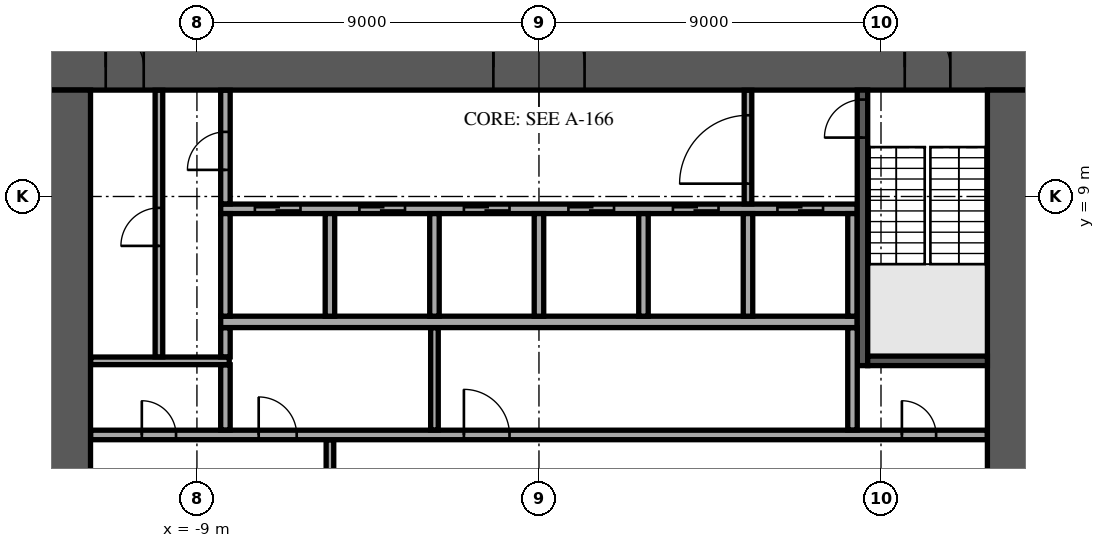
"""IFC4 building model, lengths in metres.
Left out: names, types, materials, properties, quantities, classifications, styles, units other than length and angle.
Written with IfcOpenShell. Run it as: python <this file> out.ifc"""

import sys

from ifc_helpers import new_model, si_unit, direction, frame, frame_2d, origin, place, context, subcontext, project, spatial, rectangle, extrude, element, fill, save


model = new_model("IFC4")
c1 = context("Model", 3, precision=1e-05, world=origin(), true_north=direction((0.0, 1.0)))
c2 = subcontext(c1, "Body", "Model", "MODEL_VIEW")
j1 = project(units=[si_unit("LENGTHUNIT", "METRE"), si_unit("PLANEANGLEUNIT", "RADIAN")], contexts=[c1])
p1 = place(None, origin())
s1 = spatial("IfcSite", under=j1, at=p1, CompositionType="ELEMENT")
p2 = place(p1, origin())
s2 = spatial("IfcBuilding", under=s1, at=p2, CompositionType="ELEMENT")
p3 = place(p2, frame((0.0, 0.0, 13.5)))
s3 = spatial("IfcBuildingStorey", under=s2, at=p3, CompositionType="ELEMENT", Elevation=13.5)
p4 = place(p3, frame((-13.0, 12.4, 0.0), z_axis=(0.0, 0.0, 1.0), x_axis=(1.0, 0.0, 0.0)))
e1 = element("IfcWall", 1, at=p4, inside=s3, PredefinedType="SHEAR", context=c2, shape_type="SweptSolid", body=[
    extrude(rectangle(XDim=26.0, YDim=1.2, at=frame_2d((13.0, 0.0))), origin(), (0.0, 0.0, 1.0), 4.1),
])
p5 = place(p4, frame((11.8, 0.0, 0.0)))
e2 = element("IfcOpeningElement", 2, at=p5, cuts=e1, PredefinedType="OPENING", context=c2, shape_type="SweptSolid", body=[
    extrude(rectangle(XDim=2.4, YDim=2.4, at=frame_2d((1.2, 1.2))), frame((0.0, 0.61, 0.0), z_axis=(0.0, -1.0, 0.0), x_axis=(1.0, 0.0, 0.0)), (0.0, 0.0, 1.0), 1.22),
])
p6 = place(p4, frame((22.625, 0.0, 0.0)))
e3 = element("IfcOpeningElement", 3, at=p6, cuts=e1, PredefinedType="OPENING", context=c2, shape_type="SweptSolid", body=[
    extrude(rectangle(XDim=1.2, YDim=2.1, at=frame_2d((0.6, 1.05))), frame((0.0, 0.61, 0.0), z_axis=(0.0, -1.0, 0.0), x_axis=(1.0, 0.0, 0.0)), (0.0, 0.0, 1.0), 1.22),
])
p7 = place(p4, frame((1.6, 0.0, 0.0)))
e4 = element("IfcOpeningElement", 4, at=p7, cuts=e1, PredefinedType="OPENING", context=c2, shape_type="SweptSolid", body=[
    extrude(rectangle(XDim=1.0, YDim=2.1, at=frame_2d((0.5, 1.05))), frame((0.0, 0.61, 0.0), z_axis=(0.0, -1.0, 0.0), x_axis=(1.0, 0.0, 0.0)), (0.0, 0.0, 1.0), 1.22),
])
p8 = place(p3, frame((12.4, -11.8, 0.0), z_axis=(0.0, 0.0, 1.0), x_axis=(0.0, 1.0, 0.0)))
e5 = element("IfcWall", 5, at=p8, inside=s3, PredefinedType="SHEAR", context=c2, shape_type="SweptSolid", body=[
    extrude(rectangle(XDim=23.6, YDim=1.2, at=frame_2d((11.8, 0.0))), origin(), (0.0, 0.0, 1.0), 4.1),
])
p9 = place(p8, frame((10.6, 0.0, 0.0)))
e6 = element("IfcOpeningElement", 6, at=p9, cuts=e5, PredefinedType="OPENING", context=c2, shape_type="SweptSolid", body=[
    extrude(rectangle(XDim=2.4, YDim=2.4, at=frame_2d((1.2, 1.2))), frame((0.0, 0.61, 0.0), z_axis=(0.0, -1.0, 0.0), x_axis=(1.0, 0.0, 0.0)), (0.0, 0.0, 1.0), 1.22),
])
p10 = place(p3, frame((-12.4, -11.8, 0.0), z_axis=(0.0, 0.0, 1.0), x_axis=(0.0, 1.0, 0.0)))
e7 = element("IfcWall", 7, at=p10, inside=s3, PredefinedType="SHEAR", context=c2, shape_type="SweptSolid", body=[
    extrude(rectangle(XDim=23.6, YDim=1.2, at=frame_2d((11.8, 0.0))), origin(), (0.0, 0.0, 1.0), 4.1),
])
p11 = place(p10, frame((10.6, 0.0, 0.0)))
e8 = element("IfcOpeningElement", 8, at=p11, cuts=e7, PredefinedType="OPENING", context=c2, shape_type="SweptSolid", body=[
    extrude(rectangle(XDim=2.4, YDim=2.4, at=frame_2d((1.2, 1.2))), frame((0.0, 0.61, 0.0), z_axis=(0.0, -1.0, 0.0), x_axis=(1.0, 0.0, 0.0)), (0.0, 0.0, 1.0), 1.22),
])
p12 = place(p3, frame((-8.375, 5.7, 0.0), z_axis=(0.0, 0.0, 1.0), x_axis=(1.0, 0.0, 0.0)))
e9 = element("IfcWall", 9, at=p12, inside=s3, PredefinedType="SOLIDWALL", context=c2, shape_type="SweptSolid", body=[
    extrude(rectangle(XDim=16.75, YDim=0.3, at=frame_2d((8.375, 0.0))), origin(), (0.0, 0.0, 1.0), 4.1),
])
p13 = place(p3, frame((-8.375, 8.675, 0.0), z_axis=(0.0, 0.0, 1.0), x_axis=(1.0, 0.0, 0.0)))
e10 = element("IfcWall", 10, at=p13, inside=s3, PredefinedType="SOLIDWALL", context=c2, shape_type="SweptSolid", body=[
    extrude(rectangle(XDim=16.75, YDim=0.25, at=frame_2d((8.375, 0.0))), origin(), (0.0, 0.0, 1.0), 4.1),
])
p14 = place(p13, frame((0.9, 0.0, 0.0)))
e11 = element("IfcOpeningElement", 11, at=p14, cuts=e10, PredefinedType="OPENING", context=c2, shape_type="SweptSolid", body=[
    extrude(rectangle(XDim=1.2, YDim=2.1, at=frame_2d((0.6, 1.05))), frame((0.0, 0.135, 0.0), z_axis=(0.0, -1.0, 0.0), x_axis=(1.0, 0.0, 0.0)), (0.0, 0.0, 1.0), 0.27),
])
p15 = place(p13, frame((3.65, 0.0, 0.0)))
e12 = element("IfcOpeningElement", 12, at=p15, cuts=e10, PredefinedType="OPENING", context=c2, shape_type="SweptSolid", body=[
    extrude(rectangle(XDim=1.2, YDim=2.1, at=frame_2d((0.6, 1.05))), frame((0.0, 0.135, 0.0), z_axis=(0.0, -1.0, 0.0), x_axis=(1.0, 0.0, 0.0)), (0.0, 0.0, 1.0), 0.27),
])
p16 = place(p13, frame((6.4, 0.0, 0.0)))
e13 = element("IfcOpeningElement", 13, at=p16, cuts=e10, PredefinedType="OPENING", context=c2, shape_type="SweptSolid", body=[
    extrude(rectangle(XDim=1.2, YDim=2.1, at=frame_2d((0.6, 1.05))), frame((0.0, 0.135, 0.0), z_axis=(0.0, -1.0, 0.0), x_axis=(1.0, 0.0, 0.0)), (0.0, 0.0, 1.0), 0.27),
])
p17 = place(p13, frame((9.15, 0.0, 0.0)))
e14 = element("IfcOpeningElement", 14, at=p17, cuts=e10, PredefinedType="OPENING", context=c2, shape_type="SweptSolid", body=[
    extrude(rectangle(XDim=1.2, YDim=2.1, at=frame_2d((0.6, 1.05))), frame((0.0, 0.135, 0.0), z_axis=(0.0, -1.0, 0.0), x_axis=(1.0, 0.0, 0.0)), (0.0, 0.0, 1.0), 0.27),
])
p18 = place(p13, frame((11.9, 0.0, 0.0)))
e15 = element("IfcOpeningElement", 15, at=p18, cuts=e10, PredefinedType="OPENING", context=c2, shape_type="SweptSolid", body=[
    extrude(rectangle(XDim=1.2, YDim=2.1, at=frame_2d((0.6, 1.05))), frame((0.0, 0.135, 0.0), z_axis=(0.0, -1.0, 0.0), x_axis=(1.0, 0.0, 0.0)), (0.0, 0.0, 1.0), 0.27),
])
p19 = place(p13, frame((14.65, 0.0, 0.0)))
e16 = element("IfcOpeningElement", 16, at=p19, cuts=e10, PredefinedType="OPENING", context=c2, shape_type="SweptSolid", body=[
    extrude(rectangle(XDim=1.2, YDim=2.1, at=frame_2d((0.6, 1.05))), frame((0.0, 0.135, 0.0), z_axis=(0.0, -1.0, 0.0), x_axis=(1.0, 0.0, 0.0)), (0.0, 0.0, 1.0), 0.27),
])
for number, where, z_axis, x_axis in (
    (17, (-8.25, 5.85, 0.0), (0.0, 0.0, 1.0), (0.0, 1.0, 0.0)),
    (18, (-5.5, 5.85, 0.0), (0.0, 0.0, 1.0), (0.0, 1.0, 0.0)),
    (19, (-2.75, 5.85, 0.0), (0.0, 0.0, 1.0), (0.0, 1.0, 0.0)),
    (20, (0.0, 5.85, 0.0), (0.0, 0.0, 1.0), (0.0, 1.0, 0.0)),
    (21, (2.75, 5.85, 0.0), (0.0, 0.0, 1.0), (0.0, 1.0, 0.0)),
    (22, (5.5, 5.85, 0.0), (0.0, 0.0, 1.0), (0.0, 1.0, 0.0)),
    (23, (8.25, 5.85, 0.0), (0.0, 0.0, 1.0), (0.0, 1.0, 0.0)),
):
    element("IfcWall", number, at=place(p3, frame(where, z_axis=z_axis, x_axis=x_axis)), inside=s3, PredefinedType="SOLIDWALL", context=c2, shape_type="SweptSolid", body=[
        extrude(rectangle(XDim=2.7, YDim=0.25, at=frame_2d((1.35, 0.0))), origin(), (0.0, 0.0, 1.0), 4.1),
    ])
p20 = place(p3, frame((8.512, 4.55, 0.0), z_axis=(0.0, 0.0, 1.0), x_axis=(0.0, 1.0, 0.0)))
e24 = element("IfcWall", 24, at=p20, inside=s3, PredefinedType="SOLIDWALL", context=c2, shape_type="SweptSolid", body=[
    extrude(rectangle(XDim=7.25, YDim=0.275, at=frame_2d((3.625, 0.0))), origin(), (0.0, 0.0, 1.0), 4.1),
])
p21 = place(p20, frame((6.0, 0.0, 0.0)))
e25 = element("IfcOpeningElement", 25, at=p21, cuts=e24, PredefinedType="OPENING", context=c2, shape_type="SweptSolid", body=[
    extrude(rectangle(XDim=1.0, YDim=2.1, at=frame_2d((0.5, 1.05))), frame((0.0, 0.147, 0.0), z_axis=(0.0, -1.0, 0.0), x_axis=(1.0, 0.0, 0.0)), (0.0, 0.0, 1.0), 0.295),
])
p22 = place(p3, frame((8.65, 4.675, 0.0), z_axis=(0.0, 0.0, 1.0), x_axis=(1.0, 0.0, 0.0)))
e26 = element("IfcWall", 26, at=p22, inside=s3, PredefinedType="SOLIDWALL", context=c2, shape_type="SweptSolid", body=[
    extrude(rectangle(XDim=3.15, YDim=0.25, at=frame_2d((1.575, 0.0))), origin(), (0.0, 0.0, 1.0), 4.1),
])
p23 = place(p3, frame((-5.5, -2.595, 0.0), z_axis=(0.0, 0.0, 1.0), x_axis=(0.0, 1.0, 0.0)))
e27 = element("IfcWall", 27, at=p23, inside=s3, PredefinedType="PARTITIONING", context=c2, shape_type="SweptSolid", body=[
    extrude(rectangle(XDim=5.19, YDim=0.2, at=frame_2d((2.595, 0.0))), origin(), (0.0, 0.0, 1.0), 4.1),
])
p24 = place(p23, frame((1.395, 0.0, 0.0)))
e28 = element("IfcOpeningElement", 28, at=p24, cuts=e27, PredefinedType="OPENING", context=c2, shape_type="SweptSolid", body=[
    extrude(rectangle(XDim=2.4, YDim=2.4, at=frame_2d((1.2, 1.2))), frame((0.0, 0.11, 0.0), z_axis=(0.0, -1.0, 0.0), x_axis=(1.0, 0.0, 0.0)), (0.0, 0.0, 1.0), 0.22),
])
p25 = place(p3, frame((-11.795, 2.725, 0.0), z_axis=(0.0, 0.0, 1.0), x_axis=(1.0, 0.0, 0.0)))
e29 = element("IfcWall", 29, at=p25, inside=s3, PredefinedType="PARTITIONING", context=c2, shape_type="SweptSolid", body=[
    extrude(rectangle(XDim=23.59, YDim=0.25, at=frame_2d((11.795, 0.0))), origin(), (0.0, 0.0, 1.0), 4.1),
])
p26 = place(p25, frame((21.345, 0.0, 0.0)))
e30 = element("IfcOpeningElement", 30, at=p26, cuts=e29, PredefinedType="OPENING", context=c2, shape_type="SweptSolid", body=[
    extrude(rectangle(XDim=0.9, YDim=2.1, at=frame_2d((0.45, 1.05))), frame((0.0, 0.135, 0.0), z_axis=(0.0, -1.0, 0.0), x_axis=(1.0, 0.0, 0.0)), (0.0, 0.0, 1.0), 0.27),
])
p27 = place(p25, frame((1.345, 0.0, 0.0)))
e31 = element("IfcOpeningElement", 31, at=p27, cuts=e29, PredefinedType="OPENING", context=c2, shape_type="SweptSolid", body=[
    extrude(rectangle(XDim=0.9, YDim=2.1, at=frame_2d((0.45, 1.05))), frame((0.0, 0.135, 0.0), z_axis=(0.0, -1.0, 0.0), x_axis=(1.0, 0.0, 0.0)), (0.0, 0.0, 1.0), 0.27),
])
p28 = place(p25, frame((4.42, 0.0, 0.0)))
e32 = element("IfcOpeningElement", 32, at=p28, cuts=e29, PredefinedType="OPENING", context=c2, shape_type="SweptSolid", body=[
    extrude(rectangle(XDim=1.0, YDim=2.1, at=frame_2d((0.5, 1.05))), frame((0.0, 0.135, 0.0), z_axis=(0.0, -1.0, 0.0), x_axis=(1.0, 0.0, 0.0)), (0.0, 0.0, 1.0), 0.27),
])
p29 = place(p25, frame((9.82, 0.0, 0.0)))
e33 = element("IfcOpeningElement", 33, at=p29, cuts=e29, PredefinedType="OPENING", context=c2, shape_type="SweptSolid", body=[
    extrude(rectangle(XDim=1.2, YDim=2.1, at=frame_2d((0.6, 1.05))), frame((0.0, 0.135, 0.0), z_axis=(0.0, -1.0, 0.0), x_axis=(1.0, 0.0, 0.0)), (0.0, 0.0, 1.0), 0.27),
])
p30 = place(p3, frame((-8.25, 2.855, 0.0), z_axis=(0.0, 0.0, 1.0), x_axis=(0.0, 1.0, 0.0)))
e34 = element("IfcWall", 34, at=p30, inside=s3, PredefinedType="PARTITIONING", context=c2, shape_type="SweptSolid", body=[
    extrude(rectangle(XDim=1.715, YDim=0.25, at=frame_2d((0.857, 0.0))), origin(), (0.0, 0.0, 1.0), 4.1),
])
p31 = place(p3, frame((-2.75, 2.855, 0.0), z_axis=(0.0, 0.0, 1.0), x_axis=(0.0, 1.0, 0.0)))
e35 = element("IfcWall", 35, at=p31, inside=s3, PredefinedType="PARTITIONING", context=c2, shape_type="SweptSolid", body=[
    extrude(rectangle(XDim=2.69, YDim=0.2, at=frame_2d((1.345, 0.0))), origin(), (0.0, 0.0, 1.0), 4.1),
])
p32 = place(p3, frame((8.25, 2.855, 0.0), z_axis=(0.0, 0.0, 1.0), x_axis=(0.0, 1.0, 0.0)))
e36 = element("IfcWall", 36, at=p32, inside=s3, PredefinedType="PARTITIONING", context=c2, shape_type="SweptSolid", body=[
    extrude(rectangle(XDim=2.69, YDim=0.25, at=frame_2d((1.345, 0.0))), origin(), (0.0, 0.0, 1.0), 4.1),
])
p33 = place(p3, frame((-11.795, 4.675, 0.0), z_axis=(0.0, 0.0, 1.0), x_axis=(1.0, 0.0, 0.0)))
e37 = element("IfcWall", 37, at=p33, inside=s3, PredefinedType="PARTITIONING", context=c2, shape_type="SweptSolid", body=[
    extrude(rectangle(XDim=3.645, YDim=0.2, at=frame_2d((1.823, 0.0))), origin(), (0.0, 0.0, 1.0), 4.1),
])
p34 = place(p3, frame((-10.0, 4.78, 0.0), z_axis=(0.0, 0.0, 1.0), x_axis=(0.0, 1.0, 0.0)))
e38 = element("IfcWall", 38, at=p34, inside=s3, PredefinedType="PARTITIONING", context=c2, shape_type="SweptSolid", body=[
    extrude(rectangle(XDim=7.015, YDim=0.2, at=frame_2d((3.507, 0.0))), origin(), (0.0, 0.0, 1.0), 4.1),
])
p35 = place(p34, frame((2.92, 0.0, 0.0)))
e39 = element("IfcOpeningElement", 39, at=p35, cuts=e38, PredefinedType="OPENING", context=c2, shape_type="SweptSolid", body=[
    extrude(rectangle(XDim=1.0, YDim=2.1, at=frame_2d((0.5, 1.05))), frame((0.0, 0.11, 0.0), z_axis=(0.0, -1.0, 0.0), x_axis=(1.0, 0.0, 0.0)), (0.0, 0.0, 1.0), 0.22),
])
p36 = place(p3, frame((-8.25, 4.78, 0.0), z_axis=(0.0, 0.0, 1.0), x_axis=(0.0, 1.0, 0.0)))
e40 = element("IfcWall", 40, at=p36, inside=s3, PredefinedType="PARTITIONING", context=c2, shape_type="SweptSolid", body=[
    extrude(rectangle(XDim=0.765, YDim=0.25, at=frame_2d((0.382, 0.0))), origin(), (0.0, 0.0, 1.0), 4.1),
])
p37 = place(p3, frame((-8.25, 8.805, 0.0), z_axis=(0.0, 0.0, 1.0), x_axis=(0.0, 1.0, 0.0)))
e41 = element("IfcWall", 41, at=p37, inside=s3, PredefinedType="PARTITIONING", context=c2, shape_type="SweptSolid", body=[
    extrude(rectangle(XDim=2.99, YDim=0.25, at=frame_2d((1.495, 0.0))), origin(), (0.0, 0.0, 1.0), 4.1),
])
p38 = place(p37, frame((0.895, 0.0, 0.0)))
e42 = element("IfcOpeningElement", 42, at=p38, cuts=e41, PredefinedType="OPENING", context=c2, shape_type="SweptSolid", body=[
    extrude(rectangle(XDim=1.0, YDim=2.1, at=frame_2d((0.5, 1.05))), frame((0.0, 0.135, 0.0), z_axis=(0.0, -1.0, 0.0), x_axis=(1.0, 0.0, 0.0)), (0.0, 0.0, 1.0), 0.27),
])
p39 = place(p3, frame((5.5, 8.805, 0.0), z_axis=(0.0, 0.0, 1.0), x_axis=(0.0, 1.0, 0.0)))
e43 = element("IfcWall", 43, at=p39, inside=s3, PredefinedType="PARTITIONING", context=c2, shape_type="SweptSolid", body=[
    extrude(rectangle(XDim=2.99, YDim=0.2, at=frame_2d((1.495, 0.0))), origin(), (0.0, 0.0, 1.0), 4.1),
])
p40 = place(p39, frame((0.532, 0.0, 0.0)))
e44 = element("IfcOpeningElement", 44, at=p40, cuts=e43, PredefinedType="OPENING", context=c2, shape_type="SweptSolid", body=[
    extrude(rectangle(XDim=1.8, YDim=2.1, at=frame_2d((0.9, 1.05))), frame((0.0, 0.11, 0.0), z_axis=(0.0, -1.0, 0.0), x_axis=(1.0, 0.0, 0.0)), (0.0, 0.0, 1.0), 0.22),
])
p41 = place(p5, origin())
e45 = element("IfcDoor", 45, at=p41, inside=s3, OperationType="SINGLE_SWING_LEFT", PredefinedType="DOOR", context=c2, shape_type="SweptSolid", body=[
    extrude(rectangle(XDim=2.4, YDim=2.4, at=frame_2d((1.2, 1.2))), frame((0.0, 0.025, 0.0), z_axis=(0.0, -1.0, 0.0), x_axis=(1.0, 0.0, 0.0)), (0.0, 0.0, 1.0), 0.05),
])
fill(e2, e45)
p42 = place(p6, origin())
e46 = element("IfcDoor", 46, at=p42, inside=s3, OperationType="SINGLE_SWING_LEFT", PredefinedType="DOOR", context=c2, shape_type="SweptSolid", body=[
    extrude(rectangle(XDim=1.2, YDim=2.1, at=frame_2d((0.6, 1.05))), frame((0.0, 0.025, 0.0), z_axis=(0.0, -1.0, 0.0), x_axis=(1.0, 0.0, 0.0)), (0.0, 0.0, 1.0), 0.05),
])
fill(e3, e46)
p43 = place(p7, origin())
e47 = element("IfcDoor", 47, at=p43, inside=s3, OperationType="SINGLE_SWING_LEFT", PredefinedType="DOOR", context=c2, shape_type="SweptSolid", body=[
    extrude(rectangle(XDim=1.0, YDim=2.1, at=frame_2d((0.5, 1.05))), frame((0.0, 0.025, 0.0), z_axis=(0.0, -1.0, 0.0), x_axis=(1.0, 0.0, 0.0)), (0.0, 0.0, 1.0), 0.05),
])
fill(e4, e47)
p44 = place(p14, origin())
e48 = element("IfcDoor", 48, at=p44, inside=s3, OperationType="DOUBLE_DOOR_SLIDING", PredefinedType="DOOR", context=c2, shape_type="SweptSolid", body=[
    extrude(rectangle(XDim=1.2, YDim=2.1, at=frame_2d((0.6, 1.05))), frame((0.0, 0.025, 0.0), z_axis=(0.0, -1.0, 0.0), x_axis=(1.0, 0.0, 0.0)), (0.0, 0.0, 1.0), 0.05),
])
fill(e11, e48)
p45 = place(p15, origin())
e49 = element("IfcDoor", 49, at=p45, inside=s3, OperationType="DOUBLE_DOOR_SLIDING", PredefinedType="DOOR", context=c2, shape_type="SweptSolid", body=[
    extrude(rectangle(XDim=1.2, YDim=2.1, at=frame_2d((0.6, 1.05))), frame((0.0, 0.025, 0.0), z_axis=(0.0, -1.0, 0.0), x_axis=(1.0, 0.0, 0.0)), (0.0, 0.0, 1.0), 0.05),
])
fill(e12, e49)
p46 = place(p16, origin())
e50 = element("IfcDoor", 50, at=p46, inside=s3, OperationType="DOUBLE_DOOR_SLIDING", PredefinedType="DOOR", context=c2, shape_type="SweptSolid", body=[
    extrude(rectangle(XDim=1.2, YDim=2.1, at=frame_2d((0.6, 1.05))), frame((0.0, 0.025, 0.0), z_axis=(0.0, -1.0, 0.0), x_axis=(1.0, 0.0, 0.0)), (0.0, 0.0, 1.0), 0.05),
])
fill(e13, e50)
p47 = place(p17, origin())
e51 = element("IfcDoor", 51, at=p47, inside=s3, OperationType="DOUBLE_DOOR_SLIDING", PredefinedType="DOOR", context=c2, shape_type="SweptSolid", body=[
    extrude(rectangle(XDim=1.2, YDim=2.1, at=frame_2d((0.6, 1.05))), frame((0.0, 0.025, 0.0), z_axis=(0.0, -1.0, 0.0), x_axis=(1.0, 0.0, 0.0)), (0.0, 0.0, 1.0), 0.05),
])
fill(e14, e51)
p48 = place(p18, origin())
e52 = element("IfcDoor", 52, at=p48, inside=s3, OperationType="DOUBLE_DOOR_SLIDING", PredefinedType="DOOR", context=c2, shape_type="SweptSolid", body=[
    extrude(rectangle(XDim=1.2, YDim=2.1, at=frame_2d((0.6, 1.05))), frame((0.0, 0.025, 0.0), z_axis=(0.0, -1.0, 0.0), x_axis=(1.0, 0.0, 0.0)), (0.0, 0.0, 1.0), 0.05),
])
fill(e15, e52)
p49 = place(p19, origin())
e53 = element("IfcDoor", 53, at=p49, inside=s3, OperationType="DOUBLE_DOOR_SLIDING", PredefinedType="DOOR", context=c2, shape_type="SweptSolid", body=[
    extrude(rectangle(XDim=1.2, YDim=2.1, at=frame_2d((0.6, 1.05))), frame((0.0, 0.025, 0.0), z_axis=(0.0, -1.0, 0.0), x_axis=(1.0, 0.0, 0.0)), (0.0, 0.0, 1.0), 0.05),
])
fill(e16, e53)
p50 = place(p21, origin())
e54 = element("IfcDoor", 54, at=p50, inside=s3, OperationType="SINGLE_SWING_LEFT", PredefinedType="DOOR", context=c2, shape_type="SweptSolid", body=[
    extrude(rectangle(XDim=1.0, YDim=2.1, at=frame_2d((0.5, 1.05))), frame((0.0, 0.025, 0.0), z_axis=(0.0, -1.0, 0.0), x_axis=(1.0, 0.0, 0.0)), (0.0, 0.0, 1.0), 0.05),
])
fill(e25, e54)
p51 = place(p26, origin())
e55 = element("IfcDoor", 55, at=p51, inside=s3, OperationType="SINGLE_SWING_RIGHT", PredefinedType="DOOR", context=c2, shape_type="SweptSolid", body=[
    extrude(rectangle(XDim=0.9, YDim=2.1, at=frame_2d((0.45, 1.05))), frame((0.0, 0.025, 0.0), z_axis=(0.0, -1.0, 0.0), x_axis=(1.0, 0.0, 0.0)), (0.0, 0.0, 1.0), 0.05),
])
fill(e30, e55)
p52 = place(p27, origin())
e56 = element("IfcDoor", 56, at=p52, inside=s3, OperationType="SINGLE_SWING_RIGHT", PredefinedType="DOOR", context=c2, shape_type="SweptSolid", body=[
    extrude(rectangle(XDim=0.9, YDim=2.1, at=frame_2d((0.45, 1.05))), frame((0.0, 0.025, 0.0), z_axis=(0.0, -1.0, 0.0), x_axis=(1.0, 0.0, 0.0)), (0.0, 0.0, 1.0), 0.05),
])
fill(e31, e56)
p53 = place(p35, origin())
e57 = element("IfcDoor", 57, at=p53, inside=s3, OperationType="SINGLE_SWING_RIGHT", PredefinedType="DOOR", context=c2, shape_type="SweptSolid", body=[
    extrude(rectangle(XDim=1.0, YDim=2.1, at=frame_2d((0.5, 1.05))), frame((0.0, 0.025, 0.0), z_axis=(0.0, -1.0, 0.0), x_axis=(1.0, 0.0, 0.0)), (0.0, 0.0, 1.0), 0.05),
])
fill(e39, e57)
p54 = place(p38, origin())
e58 = element("IfcDoor", 58, at=p54, inside=s3, OperationType="SINGLE_SWING_RIGHT", PredefinedType="DOOR", context=c2, shape_type="SweptSolid", body=[
    extrude(rectangle(XDim=1.0, YDim=2.1, at=frame_2d((0.5, 1.05))), frame((0.0, 0.025, 0.0), z_axis=(0.0, -1.0, 0.0), x_axis=(1.0, 0.0, 0.0)), (0.0, 0.0, 1.0), 0.05),
])
fill(e42, e58)
p55 = place(p28, origin())
e59 = element("IfcDoor", 59, at=p55, inside=s3, OperationType="SINGLE_SWING_RIGHT", PredefinedType="DOOR", context=c2, shape_type="SweptSolid", body=[
    extrude(rectangle(XDim=1.0, YDim=2.1, at=frame_2d((0.5, 1.05))), frame((0.0, 0.025, 0.0), z_axis=(0.0, -1.0, 0.0), x_axis=(1.0, 0.0, 0.0)), (0.0, 0.0, 1.0), 0.05),
])
fill(e32, e59)
p56 = place(p29, origin())
e60 = element("IfcDoor", 60, at=p56, inside=s3, OperationType="SINGLE_SWING_LEFT", PredefinedType="DOOR", context=c2, shape_type="SweptSolid", body=[
    extrude(rectangle(XDim=1.2, YDim=2.1, at=frame_2d((0.6, 1.05))), frame((0.0, 0.025, 0.0), z_axis=(0.0, -1.0, 0.0), x_axis=(1.0, 0.0, 0.0)), (0.0, 0.0, 1.0), 0.05),
])
fill(e33, e60)
p57 = place(p40, origin())
e61 = element("IfcDoor", 61, at=p57, inside=s3, OperationType="SINGLE_SWING_LEFT", PredefinedType="DOOR", context=c2, shape_type="SweptSolid", body=[
    extrude(rectangle(XDim=1.8, YDim=2.1, at=frame_2d((0.9, 1.05))), frame((0.0, 0.025, 0.0), z_axis=(0.0, -1.0, 0.0), x_axis=(1.0, 0.0, 0.0)), (0.0, 0.0, 1.0), 0.05),
])
fill(e44, e61)
save(model, sys.argv[1])
